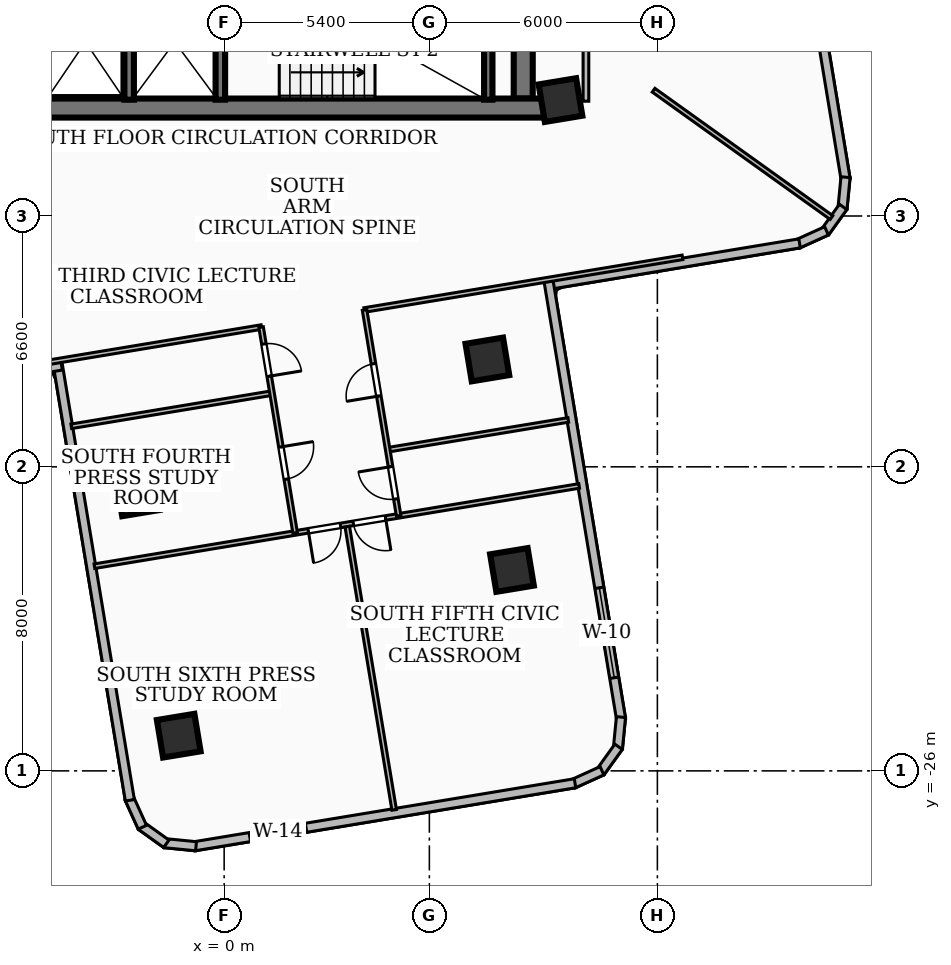
"""IFC4 building model, lengths in metres.
Left out: names, types, materials, properties, quantities, classifications, styles, units other than length and angle.
Written with IfcOpenShell. Run it as: python <this file> out.ifc"""

import sys

from ifc_helpers import new_model, si_unit, direction, frame, frame_2d, origin, origin_2d, place, context, subcontext, project, spatial, rectangle, extrude, element, fill, save


model = new_model("IFC4")
c1 = context("Model", 3, precision=1e-05, world=origin(), true_north=direction((0.0, 1.0)))
c2 = subcontext(c1, "Body", "Model", "MODEL_VIEW")
j1 = project(units=[si_unit("LENGTHUNIT", "METRE"), si_unit("PLANEANGLEUNIT", "RADIAN")], contexts=[c1])
p1 = place(None, origin())
s1 = spatial("IfcSite", under=j1, at=p1, CompositionType="ELEMENT")
p2 = place(p1, origin())
s2 = spatial("IfcBuilding", under=s1, at=p2, CompositionType="ELEMENT")
p3 = place(p2, frame((0.0, 0.0, 92.88)))
s3 = spatial("IfcBuildingStorey", under=s2, at=p3, CompositionType="ELEMENT", Elevation=92.88)
p4 = place(p3, frame((8.78, -8.56, 0.0), z_axis=(0.0, 0.0, 1.0), x_axis=(-1.0, 0.0, 0.0)))
e1 = element("IfcWall", 1, at=p4, inside=s3, PredefinedType="SHEAR", context=c2, shape_type="SweptSolid", body=[
    extrude(rectangle(XDim=17.56, YDim=0.5, at=frame_2d((8.78, 0.0))), origin(), (0.0, 0.0, 1.0), 3.34),
])
p5 = place(p3, frame((7.87, -2.0, 0.0), z_axis=(0.0, 0.0, 1.0), x_axis=(0.0, -1.0, 0.0)))
e2 = element("IfcWall", 2, at=p5, inside=s3, PredefinedType="SHEAR", context=c2, shape_type="SweptSolid", body=[
    extrude(rectangle(XDim=6.31, YDim=0.5, at=frame_2d((3.155, 0.0))), origin(), (0.0, 0.0, 1.0), 3.34),
])
p6 = place(p3, frame((6.95, -8.34, 0.0), z_axis=(0.0, 0.0, 1.0), x_axis=(0.0, 1.0, 0.0)))
e3 = element("IfcWall", 3, at=p6, inside=s3, PredefinedType="SOLIDWALL", context=c2, shape_type="SweptSolid", body=[
    extrude(rectangle(XDim=3.06, YDim=0.22, at=frame_2d((1.53, 0.0))), origin(), (0.0, 0.0, 1.0), 3.34),
])
for number, where, z_axis, x_axis in (
    (4, (-0.1, -8.34, 0.0), (0.0, 0.0, 1.0), (0.0, 1.0, 0.0)),
    (5, (-2.5, -8.34, 0.0), (0.0, 0.0, 1.0), (0.0, 1.0, 0.0)),
):
    element("IfcWall", number, at=place(p3, frame(where, z_axis=z_axis, x_axis=x_axis)), inside=s3, PredefinedType="SOLIDWALL", context=c2, shape_type="SweptSolid", body=[
        extrude(rectangle(XDim=3.04, YDim=0.25, at=frame_2d((1.52, 0.0))), origin(), (0.0, 0.0, 1.0), 3.34),
    ])
for number, where, z_axis, x_axis in (
    (6, (8.85, -8.35, 0.0), (0.0, 0.0, 1.0), (0.987, 0.163, 0.0)),
    (7, (-2.271, -18.724, 0.0), (0.0, 0.0, 1.0), (0.987, 0.163, 0.0)),
    (8, (6.927, -15.175, 0.0), (0.0, 0.0, 1.0), (0.987, 0.163, 0.0)),
    (9, (-1.195, -25.074, 0.0), (0.0, 0.0, 1.0), (0.987, 0.163, 0.0)),
    (10, (7.574, -20.714, 0.0), (0.0, 0.0, 1.0), (0.987, 0.163, 0.0)),
):
    element("IfcColumn", number, at=place(p3, frame(where, z_axis=z_axis, x_axis=x_axis)), inside=s3, PredefinedType="COLUMN", context=c2, shape_type="SweptSolid", body=[
        extrude(rectangle(XDim=1.0, YDim=1.0, at=origin_2d()), origin(), (0.0, 0.0, 1.0), 3.6),
    ])
p7 = place(p3, frame((15.335, -4.276, 0.0), z_axis=(0.0, 0.0, 1.0), x_axis=(0.16323720082, -0.986586851863, 0.0)))
e11 = element("IfcWall", 11, at=p7, inside=s3, PredefinedType="SOLIDWALL", context=c2, shape_type="SweptSolid", body=[
    extrude(rectangle(XDim=6.237, YDim=0.24, at=frame_2d((3.118, 0.0))), origin(), (0.0, 0.0, 1.0), 3.34),
])
p8 = place(p3, frame((16.351, -10.379, 0.0), z_axis=(0.0, 0.0, 1.0), x_axis=(-0.096474594184, -0.995335447313, 0.0)))
e12 = element("IfcWall", 12, at=p8, inside=s3, PredefinedType="SOLIDWALL", context=c2, shape_type="SweptSolid", body=[
    extrude(rectangle(XDim=0.83, YDim=0.24, at=frame_2d((0.415, 0.0))), origin(), (0.0, 0.0, 1.0), 3.34),
])
p9 = place(p3, frame((16.288, -11.16, 0.0), z_axis=(0.0, 0.0, 1.0), x_axis=(-0.583561896965, -0.812068662375, 0.0)))
e13 = element("IfcWall", 13, at=p9, inside=s3, PredefinedType="SOLIDWALL", context=c2, shape_type="SweptSolid", body=[
    extrude(rectangle(XDim=0.814, YDim=0.24, at=frame_2d((0.407, 0.0))), origin(), (0.0, 0.0, 1.0), 3.34),
])
p10 = place(p3, frame((15.851, -11.791, 0.0), z_axis=(0.0, 0.0, 1.0), x_axis=(-0.910868773958, -0.412696106872, 0.0)))
e14 = element("IfcWall", 14, at=p10, inside=s3, PredefinedType="SOLIDWALL", context=c2, shape_type="SweptSolid", body=[
    extrude(rectangle(XDim=0.831, YDim=0.24, at=frame_2d((0.416, 0.0))), origin(), (0.0, 0.0, 1.0), 3.34),
])
p11 = place(p3, frame((15.142, -12.12, 0.0), z_axis=(0.0, 0.0, 1.0), x_axis=(-0.986586085056, -0.163241835244, 0.0)))
e15 = element("IfcWall", 15, at=p11, inside=s3, PredefinedType="SOLIDWALL", context=c2, shape_type="SweptSolid", body=[
    extrude(rectangle(XDim=6.775, YDim=0.24, at=frame_2d((3.387, 0.0))), origin(), (0.0, 0.0, 1.0), 3.34),
])
p12 = place(p3, frame((8.537, -13.115, 0.0), z_axis=(0.0, 0.0, 1.0), x_axis=(0.16331392199, -0.986574154782, 0.0)))
e16 = element("IfcWall", 16, at=p12, inside=s3, PredefinedType="SOLIDWALL", context=c2, shape_type="SweptSolid", body=[
    extrude(rectangle(XDim=11.677, YDim=0.24, at=frame_2d((5.838, 0.0))), origin(), (0.0, 0.0, 1.0), 3.34),
])
p13 = place(p12, frame((8.177, 0.0, 0.85)))
e17 = element("IfcOpeningElement", 17, at=p13, cuts=e16, PredefinedType="OPENING", context=c2, shape_type="SweptSolid", body=[
    extrude(rectangle(XDim=2.4, YDim=1.65, at=frame_2d((1.2, 0.825))), frame((0.0, 0.13, 0.0), z_axis=(0.0, -1.0, 0.0), x_axis=(1.0, 0.0, 0.0)), (0.0, 0.0, 1.0), 0.26),
])
p14 = place(p3, frame((10.442, -24.585, 0.0), z_axis=(0.0, 0.0, 1.0), x_axis=(-0.097377162125, -0.995247551264, 0.0)))
e18 = element("IfcWall", 18, at=p14, inside=s3, PredefinedType="SOLIDWALL", context=c2, shape_type="SweptSolid", body=[
    extrude(rectangle(XDim=0.83, YDim=0.24, at=frame_2d((0.415, 0.0))), origin(), (0.0, 0.0, 1.0), 3.34),
])
p15 = place(p3, frame((10.378, -25.366, 0.0), z_axis=(0.0, 0.0, 1.0), x_axis=(-0.582571818602, -0.812779229662, 0.0)))
e19 = element("IfcWall", 19, at=p15, inside=s3, PredefinedType="SOLIDWALL", context=c2, shape_type="SweptSolid", body=[
    extrude(rectangle(XDim=0.813, YDim=0.24, at=frame_2d((0.407, 0.0))), origin(), (0.0, 0.0, 1.0), 3.34),
])
p16 = place(p3, frame((9.942, -25.997, 0.0), z_axis=(0.0, 0.0, 1.0), x_axis=(-0.910818725684, -0.412806551479, 0.0)))
e20 = element("IfcWall", 20, at=p16, inside=s3, PredefinedType="SOLIDWALL", context=c2, shape_type="SweptSolid", body=[
    extrude(rectangle(XDim=0.831, YDim=0.24, at=frame_2d((0.416, 0.0))), origin(), (0.0, 0.0, 1.0), 3.34),
])
p17 = place(p3, frame((9.233, -26.326, 0.0), z_axis=(0.0, 0.0, 1.0), x_axis=(-0.986573887112, -0.163315538969, 0.0)))
e21 = element("IfcWall", 21, at=p17, inside=s3, PredefinedType="SOLIDWALL", context=c2, shape_type="SweptSolid", body=[
    extrude(rectangle(XDim=10.159, YDim=0.24, at=frame_2d((5.08, 0.0))), origin(), (0.0, 0.0, 1.0), 3.34),
])
p18 = place(p17, frame((7.174, 0.0, 0.85)))
e22 = element("IfcOpeningElement", 22, at=p18, cuts=e21, PredefinedType="OPENING", context=c2, shape_type="SweptSolid", body=[
    extrude(rectangle(XDim=1.5, YDim=1.5, at=frame_2d((0.75, 0.75))), frame((0.0, 0.13, 0.0), z_axis=(0.0, -1.0, 0.0), x_axis=(1.0, 0.0, 0.0)), (0.0, 0.0, 1.0), 0.26),
])
p19 = place(p3, frame((-0.74, -27.983, 0.0), z_axis=(0.0, 0.0, 1.0), x_axis=(-0.995247551264, 0.097377162125, 0.0)))
e23 = element("IfcWall", 23, at=p19, inside=s3, PredefinedType="SOLIDWALL", context=c2, shape_type="SweptSolid", body=[
    extrude(rectangle(XDim=0.83, YDim=0.24, at=frame_2d((0.415, 0.0))), origin(), (0.0, 0.0, 1.0), 3.34),
])
p20 = place(p3, frame((-1.521, -27.919, 0.0), z_axis=(0.0, 0.0, 1.0), x_axis=(-0.812677327872, 0.582713961359, 0.0)))
e24 = element("IfcWall", 24, at=p20, inside=s3, PredefinedType="SOLIDWALL", context=c2, shape_type="SweptSolid", body=[
    extrude(rectangle(XDim=0.813, YDim=0.24, at=frame_2d((0.407, 0.0))), origin(), (0.0, 0.0, 1.0), 3.34),
])
p21 = place(p3, frame((-2.152, -27.483, 0.0), z_axis=(0.0, 0.0, 1.0), x_axis=(-0.412806551479, 0.910818725684, 0.0)))
e25 = element("IfcWall", 25, at=p21, inside=s3, PredefinedType="SOLIDWALL", context=c2, shape_type="SweptSolid", body=[
    extrude(rectangle(XDim=0.831, YDim=0.24, at=frame_2d((0.416, 0.0))), origin(), (0.0, 0.0, 1.0), 3.34),
])
p22 = place(p3, frame((-2.481, -26.774, 0.0), z_axis=(0.0, 0.0, 1.0), x_axis=(-0.16326282821, 0.986582611303, 0.0)))
e26 = element("IfcWall", 26, at=p22, inside=s3, PredefinedType="SOLIDWALL", context=c2, shape_type="SweptSolid", body=[
    extrude(rectangle(XDim=11.675, YDim=0.24, at=frame_2d((5.837, 0.0))), origin(), (0.0, 0.0, 1.0), 2.486),
])
p23 = place(p3, frame((-4.276, -15.335, 0.0), z_axis=(0.0, 0.0, 1.0), x_axis=(-0.986586851863, -0.16323720082, 0.0)))
e27 = element("IfcWall", 27, at=p23, inside=s3, PredefinedType="SOLIDWALL", context=c2, shape_type="SweptSolid", body=[
    extrude(rectangle(XDim=6.237, YDim=0.24, at=frame_2d((3.118, 0.0))), origin(), (0.0, 0.0, 1.0), 2.486),
])
p24 = place(p3, frame((9.52, -8.38, 0.0), z_axis=(0.0, 0.0, 1.0), x_axis=(0.0, 1.0, 0.0)))
e28 = element("IfcWall", 28, at=p24, inside=s3, PredefinedType="PARTITIONING", context=c2, shape_type="SweptSolid", body=[
    extrude(rectangle(XDim=6.63, YDim=0.15, at=frame_2d((3.315, 0.0))), origin(), (0.0, 0.0, 1.0), 2.486),
])
p25 = place(p3, frame((11.3, -8.09, 0.0), z_axis=(0.0, 0.0, 1.0), x_axis=(0.813131268368, -0.582080355623, 0.0)))
e29 = element("IfcWall", 29, at=p25, inside=s3, PredefinedType="PARTITIONING", context=c2, shape_type="SweptSolid", body=[
    extrude(rectangle(XDim=5.757, YDim=0.12, at=frame_2d((2.878, 0.0))), origin(), (0.0, 0.0, 1.0), 3.34),
])
p26 = place(p3, frame((3.686, -13.874, 0.0), z_axis=(0.0, 0.0, 1.0), x_axis=(0.98658138377, 0.163270245909, 0.0)))
e30 = element("IfcWall", 30, at=p26, inside=s3, PredefinedType="PARTITIONING", context=c2, shape_type="SweptSolid", body=[
    extrude(rectangle(XDim=8.489, YDim=0.12, at=frame_2d((4.245, 0.0))), origin(), (0.0, 0.0, 1.0), 2.486),
])
p27 = place(p3, frame((-6.86, -15.62, 0.0), z_axis=(0.0, 0.0, 1.0), x_axis=(0.986575116384, 0.16330811288, 0.0)))
e31 = element("IfcWall", 31, at=p27, inside=s3, PredefinedType="PARTITIONING", context=c2, shape_type="SweptSolid", body=[
    extrude(rectangle(XDim=7.949, YDim=0.12, at=frame_2d((3.974, 0.0))), origin(), (0.0, 0.0, 1.0), 2.486),
])
p28 = place(p3, frame((4.324, -17.549, 0.0), z_axis=(0.0, 0.0, 1.0), x_axis=(0.986580422227, 0.163276056047, 0.0)))
e32 = element("IfcWall", 32, at=p28, inside=s3, PredefinedType="PARTITIONING", context=c2, shape_type="SweptSolid", body=[
    extrude(rectangle(XDim=4.795, YDim=0.12, at=frame_2d((2.398, 0.0))), origin(), (0.0, 0.0, 1.0), 2.486),
])
p29 = place(p3, frame((-4.023, -16.934, 0.0), z_axis=(0.0, 0.0, 1.0), x_axis=(0.986577604904, 0.16329307855, 0.0)))
e33 = element("IfcWall", 33, at=p29, inside=s3, PredefinedType="PARTITIONING", context=c2, shape_type="SweptSolid", body=[
    extrude(rectangle(XDim=5.334, YDim=0.12, at=frame_2d((2.667, 0.0))), origin(), (0.0, 0.0, 1.0), 2.486),
])
p30 = place(p3, frame((4.592, -19.289, 0.0), z_axis=(0.0, 0.0, 1.0), x_axis=(-0.163389271883, 0.986561678677, 0.0)))
e34 = element("IfcWall", 34, at=p30, inside=s3, PredefinedType="PARTITIONING", context=c2, shape_type="SweptSolid", body=[
    extrude(rectangle(XDim=5.49, YDim=0.12, at=frame_2d((2.745, 0.0))), origin(), (0.0, 0.0, 1.0), 3.34),
])
p31 = place(p30, frame((3.195, 0.0, 0.0)))
e35 = element("IfcOpeningElement", 35, at=p31, cuts=e34, PredefinedType="OPENING", context=c2, shape_type="SweptSolid", body=[
    extrude(rectangle(XDim=0.86, YDim=2.04, at=frame_2d((0.43, 1.02))), frame((0.0, 0.07, 0.0), z_axis=(0.0, -1.0, 0.0), x_axis=(1.0, 0.0, 0.0)), (0.0, 0.0, 1.0), 0.14),
])
p32 = place(p30, frame((0.45, 0.0, 0.0)))
e36 = element("IfcOpeningElement", 36, at=p32, cuts=e34, PredefinedType="OPENING", context=c2, shape_type="SweptSolid", body=[
    extrude(rectangle(XDim=0.86, YDim=2.04, at=frame_2d((0.43, 1.02))), frame((0.0, 0.07, 0.0), z_axis=(0.0, -1.0, 0.0), x_axis=(1.0, 0.0, 0.0)), (0.0, 0.0, 1.0), 0.14),
])
p33 = place(p3, frame((0.972, -14.324, 0.0), z_axis=(0.0, 0.0, 1.0), x_axis=(0.163389271883, -0.986561678677, 0.0)))
e37 = element("IfcWall", 37, at=p33, inside=s3, PredefinedType="PARTITIONING", context=c2, shape_type="SweptSolid", body=[
    extrude(rectangle(XDim=5.49, YDim=0.12, at=frame_2d((2.745, 0.0))), origin(), (0.0, 0.0, 1.0), 3.34),
])
p34 = place(p33, frame((0.45, 0.0, 0.0)))
e38 = element("IfcOpeningElement", 38, at=p34, cuts=e37, PredefinedType="OPENING", context=c2, shape_type="SweptSolid", body=[
    extrude(rectangle(XDim=0.86, YDim=2.04, at=frame_2d((0.43, 1.02))), frame((0.0, 0.07, 0.0), z_axis=(0.0, -1.0, 0.0), x_axis=(1.0, 0.0, 0.0)), (0.0, 0.0, 1.0), 0.14),
])
p35 = place(p33, frame((3.195, 0.0, 0.0)))
e39 = element("IfcOpeningElement", 39, at=p35, cuts=e37, PredefinedType="OPENING", context=c2, shape_type="SweptSolid", body=[
    extrude(rectangle(XDim=0.86, YDim=2.04, at=frame_2d((0.43, 1.02))), frame((0.0, 0.07, 0.0), z_axis=(0.0, -1.0, 0.0), x_axis=(1.0, 0.0, 0.0)), (0.0, 0.0, 1.0), 0.14),
])
p36 = place(p3, frame((3.24, -19.574, 0.0), z_axis=(0.0, 0.0, 1.0), x_axis=(0.16336126604, -0.986566316452, 0.0)))
e40 = element("IfcWall", 40, at=p36, inside=s3, PredefinedType="PARTITIONING", context=c2, shape_type="SweptSolid", body=[
    extrude(rectangle(XDim=7.555, YDim=0.12, at=frame_2d((3.777, 0.0))), origin(), (0.0, 0.0, 1.0), 2.832),
])
p37 = place(p3, frame((9.342, -18.503, 0.0), z_axis=(0.0, 0.0, 1.0), x_axis=(-0.98656840645, -0.163348643691, 0.0)))
e41 = element("IfcWall", 41, at=p37, inside=s3, PredefinedType="PARTITIONING", context=c2, shape_type="SweptSolid", body=[
    extrude(rectangle(XDim=12.93, YDim=0.12, at=frame_2d((6.465, 0.0))), origin(), (0.0, 0.0, 1.0), 2.486),
])
p38 = place(p37, frame((6.365, 0.0, 0.0)))
e42 = element("IfcOpeningElement", 42, at=p38, cuts=e41, PredefinedType="OPENING", context=c2, shape_type="SweptSolid", body=[
    extrude(rectangle(XDim=0.86, YDim=2.04, at=frame_2d((0.43, 1.02))), frame((0.0, 0.07, 0.0), z_axis=(0.0, -1.0, 0.0), x_axis=(1.0, 0.0, 0.0)), (0.0, 0.0, 1.0), 0.14),
])
p39 = place(p37, frame((5.164, 0.0, 0.0)))
e43 = element("IfcOpeningElement", 43, at=p39, cuts=e41, PredefinedType="OPENING", context=c2, shape_type="SweptSolid", body=[
    extrude(rectangle(XDim=0.86, YDim=2.04, at=frame_2d((0.43, 1.02))), frame((0.0, 0.07, 0.0), z_axis=(0.0, -1.0, 0.0), x_axis=(1.0, 0.0, 0.0)), (0.0, 0.0, 1.0), 0.14),
])
p40 = place(p13, origin())
e44 = element("IfcWindow", 44, at=p40, inside=s3, PartitioningType="SINGLE_PANEL", PredefinedType="WINDOW", context=c2, shape_type="SweptSolid", body=[
    extrude(rectangle(XDim=2.4, YDim=1.65, at=frame_2d((1.2, 0.825))), frame((0.0, 0.03, 0.0), z_axis=(0.0, -1.0, 0.0), x_axis=(1.0, 0.0, 0.0)), (0.0, 0.0, 1.0), 0.06),
])
fill(e17, e44)
p41 = place(p18, origin())
e45 = element("IfcWindow", 45, at=p41, inside=s3, PartitioningType="SINGLE_PANEL", PredefinedType="WINDOW", context=c2, shape_type="SweptSolid", body=[
    extrude(rectangle(XDim=1.5, YDim=1.5, at=frame_2d((0.75, 0.75))), frame((0.0, 0.03, 0.0), z_axis=(0.0, -1.0, 0.0), x_axis=(1.0, 0.0, 0.0)), (0.0, 0.0, 1.0), 0.06),
])
fill(e22, e45)
p42 = place(p31, origin())
e46 = element("IfcDoor", 46, at=p42, inside=s3, OperationType="SINGLE_SWING_LEFT", PredefinedType="DOOR", context=c2, shape_type="SweptSolid", body=[
    extrude(rectangle(XDim=0.86, YDim=2.04, at=frame_2d((0.43, 1.02))), frame((0.0, 0.025, 0.0), z_axis=(0.0, -1.0, 0.0), x_axis=(1.0, 0.0, 0.0)), (0.0, 0.0, 1.0), 0.05),
])
fill(e35, e46)
p43 = place(p32, origin())
e47 = element("IfcDoor", 47, at=p43, inside=s3, OperationType="SINGLE_SWING_RIGHT", PredefinedType="DOOR", context=c2, shape_type="SweptSolid", body=[
    extrude(rectangle(XDim=0.86, YDim=2.04, at=frame_2d((0.43, 1.02))), frame((0.0, 0.025, 0.0), z_axis=(0.0, -1.0, 0.0), x_axis=(1.0, 0.0, 0.0)), (0.0, 0.0, 1.0), 0.05),
])
fill(e36, e47)
p44 = place(p34, origin())
e48 = element("IfcDoor", 48, at=p44, inside=s3, OperationType="SINGLE_SWING_RIGHT", PredefinedType="DOOR", context=c2, shape_type="SweptSolid", body=[
    extrude(rectangle(XDim=0.86, YDim=2.04, at=frame_2d((0.43, 1.02))), frame((0.0, 0.025, 0.0), z_axis=(0.0, -1.0, 0.0), x_axis=(1.0, 0.0, 0.0)), (0.0, 0.0, 1.0), 0.05),
])
fill(e38, e48)
p45 = place(p35, origin())
e49 = element("IfcDoor", 49, at=p45, inside=s3, OperationType="SINGLE_SWING_LEFT", PredefinedType="DOOR", context=c2, shape_type="SweptSolid", body=[
    extrude(rectangle(XDim=0.86, YDim=2.04, at=frame_2d((0.43, 1.02))), frame((0.0, 0.025, 0.0), z_axis=(0.0, -1.0, 0.0), x_axis=(1.0, 0.0, 0.0)), (0.0, 0.0, 1.0), 0.05),
])
fill(e39, e49)
p46 = place(p38, origin())
e50 = element("IfcDoor", 50, at=p46, inside=s3, OperationType="SINGLE_SWING_RIGHT", PredefinedType="DOOR", context=c2, shape_type="SweptSolid", body=[
    extrude(rectangle(XDim=0.86, YDim=2.04, at=frame_2d((0.43, 1.02))), frame((0.0, 0.025, 0.0), z_axis=(0.0, -1.0, 0.0), x_axis=(1.0, 0.0, 0.0)), (0.0, 0.0, 1.0), 0.05),
])
fill(e42, e50)
p47 = place(p39, origin())
e51 = element("IfcDoor", 51, at=p47, inside=s3, OperationType="SINGLE_SWING_LEFT", PredefinedType="DOOR", context=c2, shape_type="SweptSolid", body=[
    extrude(rectangle(XDim=0.86, YDim=2.04, at=frame_2d((0.43, 1.02))), frame((0.0, 0.025, 0.0), z_axis=(0.0, -1.0, 0.0), x_axis=(1.0, 0.0, 0.0)), (0.0, 0.0, 1.0), 0.05),
])
fill(e43, e51)
save(model, sys.argv[1])
